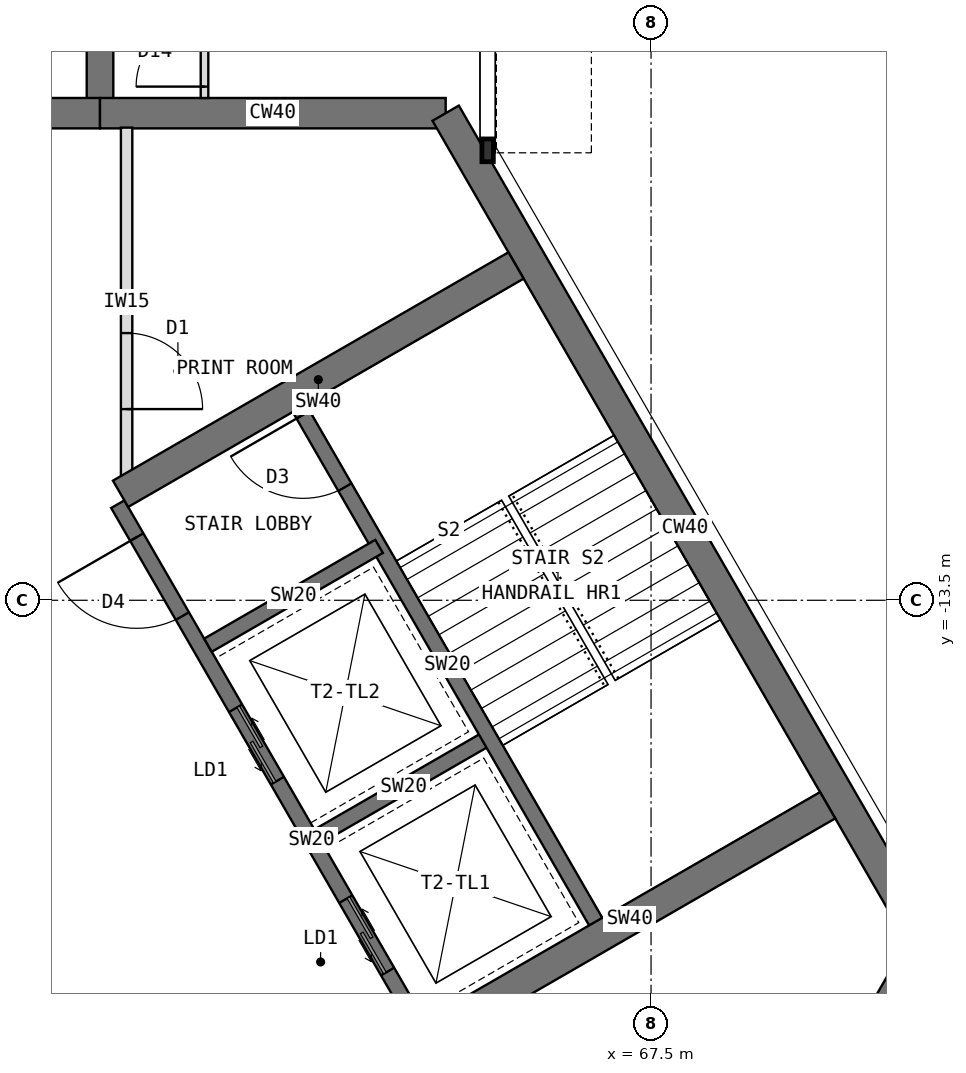
"""IFC4 building model, lengths in metres.
Left out: names, types, materials, properties, quantities, classifications, styles, units other than length and angle.
Written with IfcOpenShell. Run it as: python <this file> out.ifc"""

import sys

from ifc_helpers import new_model, si_unit, direction, frame, frame_2d, origin, place, context, subcontext, project, spatial, rectangle, extrude, element, fill, save


model = new_model("IFC4")
c1 = context("Model", 3, precision=1e-05, world=origin(), true_north=direction((0.0, 1.0)))
c2 = subcontext(c1, "Body", "Model", "MODEL_VIEW")
j1 = project(units=[si_unit("LENGTHUNIT", "METRE"), si_unit("PLANEANGLEUNIT", "RADIAN")], contexts=[c1])
p1 = place(None, origin())
s1 = spatial("IfcSite", under=j1, at=p1, CompositionType="ELEMENT")
p2 = place(p1, origin())
s2 = spatial("IfcBuilding", under=s1, at=p2, CompositionType="ELEMENT")
p3 = place(p2, frame((0.0, 0.0, 279.5)))
s3 = spatial("IfcBuildingStorey", under=s2, at=p3, CompositionType="ELEMENT", Elevation=279.5)
p4 = place(p3, frame((64.798, -7.092, 0.0), z_axis=(0.0, 0.0, 1.0), x_axis=(-1.0, 0.0, 0.0)))
e1 = element("IfcWall", 1, at=p4, inside=s3, PredefinedType="SHEAR", context=c2, shape_type="SweptSolid", body=[
    extrude(rectangle(XDim=4.548, YDim=0.4, at=frame_2d((2.274, 0.0))), origin(), (0.0, 0.0, 1.0), 4.0),
])
p5 = place(p3, frame((60.25, -7.092, 0.0), z_axis=(0.0, 0.0, 1.0), x_axis=(-1.0, 0.0, 0.0)))
e2 = element("IfcWall", 2, at=p5, inside=s3, PredefinedType="SHEAR", context=c2, shape_type="SweptSolid", body=[
    extrude(rectangle(XDim=3.5, YDim=0.4, at=frame_2d((1.75, 0.0))), origin(), (0.0, 0.0, 1.0), 4.0),
])
p6 = place(p5, frame((0.85, 0.0, 0.0)))
e3 = element("IfcOpeningElement", 3, at=p6, cuts=e2, PredefinedType="OPENING", context=c2, shape_type="SweptSolid", body=[
    extrude(rectangle(XDim=1.8, YDim=2.1, at=frame_2d((0.9, 1.05))), frame((0.0, 0.21, 0.0), z_axis=(0.0, -1.0, 0.0), x_axis=(1.0, 0.0, 0.0)), (0.0, 0.0, 1.0), 0.42),
])
p7 = place(p3, frame((68.822, -21.939, 0.0), z_axis=(0.0, 0.0, 1.0), x_axis=(0.500024481964, 0.866011268655, 0.0)))
e4 = element("IfcWall", 4, at=p7, inside=s3, PredefinedType="SHEAR", context=c2, shape_type="SweptSolid", body=[
    extrude(rectangle(XDim=4.548, YDim=0.4, at=frame_2d((2.274, 0.0))), origin(), (0.0, 0.0, 1.0), 4.0),
])
p8 = place(p3, frame((71.096, -18.0, 0.0), z_axis=(0.0, 0.0, 1.0), x_axis=(-0.500005998175, 0.866021940709, 0.0)))
e5 = element("IfcWall", 5, at=p8, inside=s3, PredefinedType="SHEAR", context=c2, shape_type="SweptSolid", body=[
    extrude(rectangle(XDim=12.596, YDim=0.4, at=frame_2d((6.298, 0.0))), origin(), (0.0, 0.0, 1.0), 4.0),
])
p9 = place(p3, frame((60.25, -7.092, 0.0), z_axis=(0.0, 0.0, 1.0), x_axis=(0.0, 1.0, 0.0)))
e6 = element("IfcWall", 6, at=p9, inside=s3, PredefinedType="SHEAR", context=c2, shape_type="SweptSolid", body=[
    extrude(rectangle(XDim=2.592, YDim=0.35, at=frame_2d((1.296, 0.0))), origin(), (0.0, 0.0, 1.0), 4.0),
])
p10 = place(p3, frame((64.484, -19.164, 0.0), z_axis=(0.0, 0.0, 1.0), x_axis=(-0.49999894854, 0.866026010844, 0.0)))
e7 = element("IfcWall", 7, at=p10, inside=s3, PredefinedType="SHEAR", context=c2, shape_type="SweptSolid", body=[
    extrude(rectangle(XDim=8.0, YDim=0.2, at=frame_2d((4.0, 0.0))), origin(), (0.0, 0.0, 1.0), 4.0),
])
p11 = place(p10, frame((6.3, 0.0, 0.0)))
e8 = element("IfcOpeningElement", 8, at=p11, cuts=e7, PredefinedType="OPENING", context=c2, shape_type="SweptSolid", body=[
    extrude(rectangle(XDim=1.2, YDim=2.1, at=frame_2d((0.6, 1.05))), frame((0.0, 0.11, 0.0), z_axis=(0.0, -1.0, 0.0), x_axis=(1.0, 0.0, 0.0)), (0.0, 0.0, 1.0), 0.22),
])
p12 = place(p10, frame((0.9, 0.0, 0.0)))
e9 = element("IfcOpeningElement", 9, at=p12, cuts=e7, PredefinedType="OPENING", context=c2, shape_type="SweptSolid", body=[
    extrude(rectangle(XDim=1.1, YDim=2.2, at=frame_2d((0.55, 1.1))), frame((0.0, 0.11, 0.0), z_axis=(0.0, -1.0, 0.0), x_axis=(1.0, 0.0, 0.0)), (0.0, 0.0, 1.0), 0.22),
])
p13 = place(p10, frame((3.8, 0.0, 0.0)))
e10 = element("IfcOpeningElement", 10, at=p13, cuts=e7, PredefinedType="OPENING", context=c2, shape_type="SweptSolid", body=[
    extrude(rectangle(XDim=1.1, YDim=2.2, at=frame_2d((0.55, 1.1))), frame((0.0, 0.11, 0.0), z_axis=(0.0, -1.0, 0.0), x_axis=(1.0, 0.0, 0.0)), (0.0, 0.0, 1.0), 0.22),
])
p14 = place(p3, frame((63.12, -16.603, 0.0), z_axis=(0.0, 0.0, 1.0), x_axis=(0.866062058628, 0.499936506574, 0.0)))
e11 = element("IfcWall", 11, at=p14, inside=s3, PredefinedType="SHEAR", context=c2, shape_type="SweptSolid", body=[
    extrude(rectangle(XDim=2.6, YDim=0.2, at=frame_2d((1.3, 0.0))), origin(), (0.0, 0.0, 1.0), 4.0),
])
p15 = place(p3, frame((61.67, -14.091, 0.0), z_axis=(0.0, 0.0, 1.0), x_axis=(0.86603858612, 0.49997716683, 0.0)))
e12 = element("IfcWall", 12, at=p15, inside=s3, PredefinedType="SHEAR", context=c2, shape_type="SweptSolid", body=[
    extrude(rectangle(XDim=2.6, YDim=0.2, at=frame_2d((1.3, 0.0))), origin(), (0.0, 0.0, 1.0), 4.0),
])
p16 = place(p3, frame((66.822, -17.814, 0.0), z_axis=(0.0, 0.0, 1.0), x_axis=(-0.49999894854, 0.866026010844, 0.0)))
e13 = element("IfcWall", 13, at=p16, inside=s3, PredefinedType="SHEAR", context=c2, shape_type="SweptSolid", body=[
    extrude(rectangle(XDim=8.0, YDim=0.2, at=frame_2d((4.0, 0.0))), origin(), (0.0, 0.0, 1.0), 4.0),
])
p17 = place(p16, frame((6.7, 0.0, 0.0)))
e14 = element("IfcOpeningElement", 14, at=p17, cuts=e13, PredefinedType="OPENING", context=c2, shape_type="SweptSolid", body=[
    extrude(rectangle(XDim=1.1, YDim=2.1, at=frame_2d((0.55, 1.05))), frame((0.0, 0.11, 0.0), z_axis=(0.0, -1.0, 0.0), x_axis=(1.0, 0.0, 0.0)), (0.0, 0.0, 1.0), 0.22),
])
for number, where, z_axis, x_axis in (
    (15, (60.52, -12.099, 0.0), (0.0, 0.0, 1.0), (0.866, 0.5, 0.0)),
    (16, (64.62, -19.201, 0.0), (0.0, 0.0, 1.0), (0.866, 0.5, 0.0)),
):
    element("IfcWall", number, at=place(p3, frame(where, z_axis=z_axis, x_axis=x_axis)), inside=s3, PredefinedType="SHEAR", context=c2, shape_type="SweptSolid", body=[
        extrude(rectangle(XDim=6.008, YDim=0.4, at=frame_2d((3.004, 0.0))), origin(), (0.0, 0.0, 1.0), 4.0),
    ])
p18 = place(p3, frame((61.625, -6.892, 0.0), z_axis=(0.0, 0.0, 1.0), x_axis=(0.0, 1.0, 0.0)))
e17 = element("IfcWall", 17, at=p18, inside=s3, PredefinedType="PARTITIONING", context=c2, shape_type="SweptSolid", body=[
    extrude(rectangle(XDim=2.4, YDim=0.1, at=frame_2d((1.2, 0.0))), origin(), (0.0, 0.0, 1.0), 3.8),
])
p19 = place(p18, frame((0.15, 0.0, 0.0)))
e18 = element("IfcOpeningElement", 18, at=p19, cuts=e17, PredefinedType="OPENING", context=c2, shape_type="SweptSolid", body=[
    extrude(rectangle(XDim=0.9, YDim=2.1, at=frame_2d((0.45, 1.05))), frame((0.0, 0.06, 0.0), z_axis=(0.0, -1.0, 0.0), x_axis=(1.0, 0.0, 0.0)), (0.0, 0.0, 1.0), 0.12),
])
p20 = place(p3, frame((60.6, -7.282, 0.0), z_axis=(0.0, 0.0, 1.0), x_axis=(0.0, -1.0, 0.0)))
e19 = element("IfcWall", 19, at=p20, inside=s3, PredefinedType="PARTITIONING", context=c2, shape_type="SweptSolid", body=[
    extrude(rectangle(XDim=4.576, YDim=0.15, at=frame_2d((2.288, 0.0))), origin(), (0.0, 0.0, 1.0), 3.8),
])
p21 = place(p20, frame((2.703, 0.0, 0.0)))
e20 = element("IfcOpeningElement", 20, at=p21, cuts=e19, PredefinedType="OPENING", context=c2, shape_type="SweptSolid", body=[
    extrude(rectangle(XDim=1.0, YDim=2.1, at=frame_2d((0.5, 1.05))), frame((0.0, 0.085, 0.0), z_axis=(0.0, -1.0, 0.0), x_axis=(1.0, 0.0, 0.0)), (0.0, 0.0, 1.0), 0.17),
])
p22 = place(p11, origin())
e21 = element("IfcDoor", 21, at=p22, inside=s3, OperationType="SINGLE_SWING_RIGHT", PredefinedType="DOOR", context=c2, shape_type="SweptSolid", body=[
    extrude(rectangle(XDim=1.2, YDim=2.1, at=frame_2d((0.6, 1.05))), frame((0.0, 0.025, 0.0), z_axis=(0.0, -1.0, 0.0), x_axis=(1.0, 0.0, 0.0)), (0.0, 0.0, 1.0), 0.05),
])
fill(e8, e21)
p23 = place(p12, origin())
e22 = element("IfcDoor", 22, at=p23, inside=s3, OperationType="DOUBLE_DOOR_SLIDING", PredefinedType="DOOR", context=c2, shape_type="SweptSolid", body=[
    extrude(rectangle(XDim=1.1, YDim=2.2, at=frame_2d((0.55, 1.1))), frame((0.0, 0.025, 0.0), z_axis=(0.0, -1.0, 0.0), x_axis=(1.0, 0.0, 0.0)), (0.0, 0.0, 1.0), 0.05),
])
fill(e9, e22)
p24 = place(p13, origin())
e23 = element("IfcDoor", 23, at=p24, inside=s3, OperationType="DOUBLE_DOOR_SLIDING", PredefinedType="DOOR", context=c2, shape_type="SweptSolid", body=[
    extrude(rectangle(XDim=1.1, YDim=2.2, at=frame_2d((0.55, 1.1))), frame((0.0, 0.025, 0.0), z_axis=(0.0, -1.0, 0.0), x_axis=(1.0, 0.0, 0.0)), (0.0, 0.0, 1.0), 0.05),
])
fill(e10, e23)
p25 = place(p17, origin())
e24 = element("IfcDoor", 24, at=p25, inside=s3, OperationType="SINGLE_SWING_RIGHT", PredefinedType="DOOR", context=c2, shape_type="SweptSolid", body=[
    extrude(rectangle(XDim=1.1, YDim=2.1, at=frame_2d((0.55, 1.05))), frame((0.0, 0.025, 0.0), z_axis=(0.0, -1.0, 0.0), x_axis=(1.0, 0.0, 0.0)), (0.0, 0.0, 1.0), 0.05),
])
fill(e14, e24)
p26 = place(p19, origin())
e25 = element("IfcDoor", 25, at=p26, inside=s3, OperationType="SINGLE_SWING_LEFT", PredefinedType="DOOR", context=c2, shape_type="SweptSolid", body=[
    extrude(rectangle(XDim=0.9, YDim=2.1, at=frame_2d((0.45, 1.05))), frame((0.0, 0.025, 0.0), z_axis=(0.0, -1.0, 0.0), x_axis=(1.0, 0.0, 0.0)), (0.0, 0.0, 1.0), 0.05),
])
fill(e18, e25)
p27 = place(p21, origin())
e26 = element("IfcDoor", 26, at=p27, inside=s3, OperationType="SINGLE_SWING_RIGHT", PredefinedType="DOOR", context=c2, shape_type="SweptSolid", body=[
    extrude(rectangle(XDim=1.0, YDim=2.1, at=frame_2d((0.5, 1.05))), frame((0.0, 0.025, 0.0), z_axis=(0.0, -1.0, 0.0), x_axis=(1.0, 0.0, 0.0)), (0.0, 0.0, 1.0), 0.05),
])
fill(e20, e26)
save(model, sys.argv[1])
